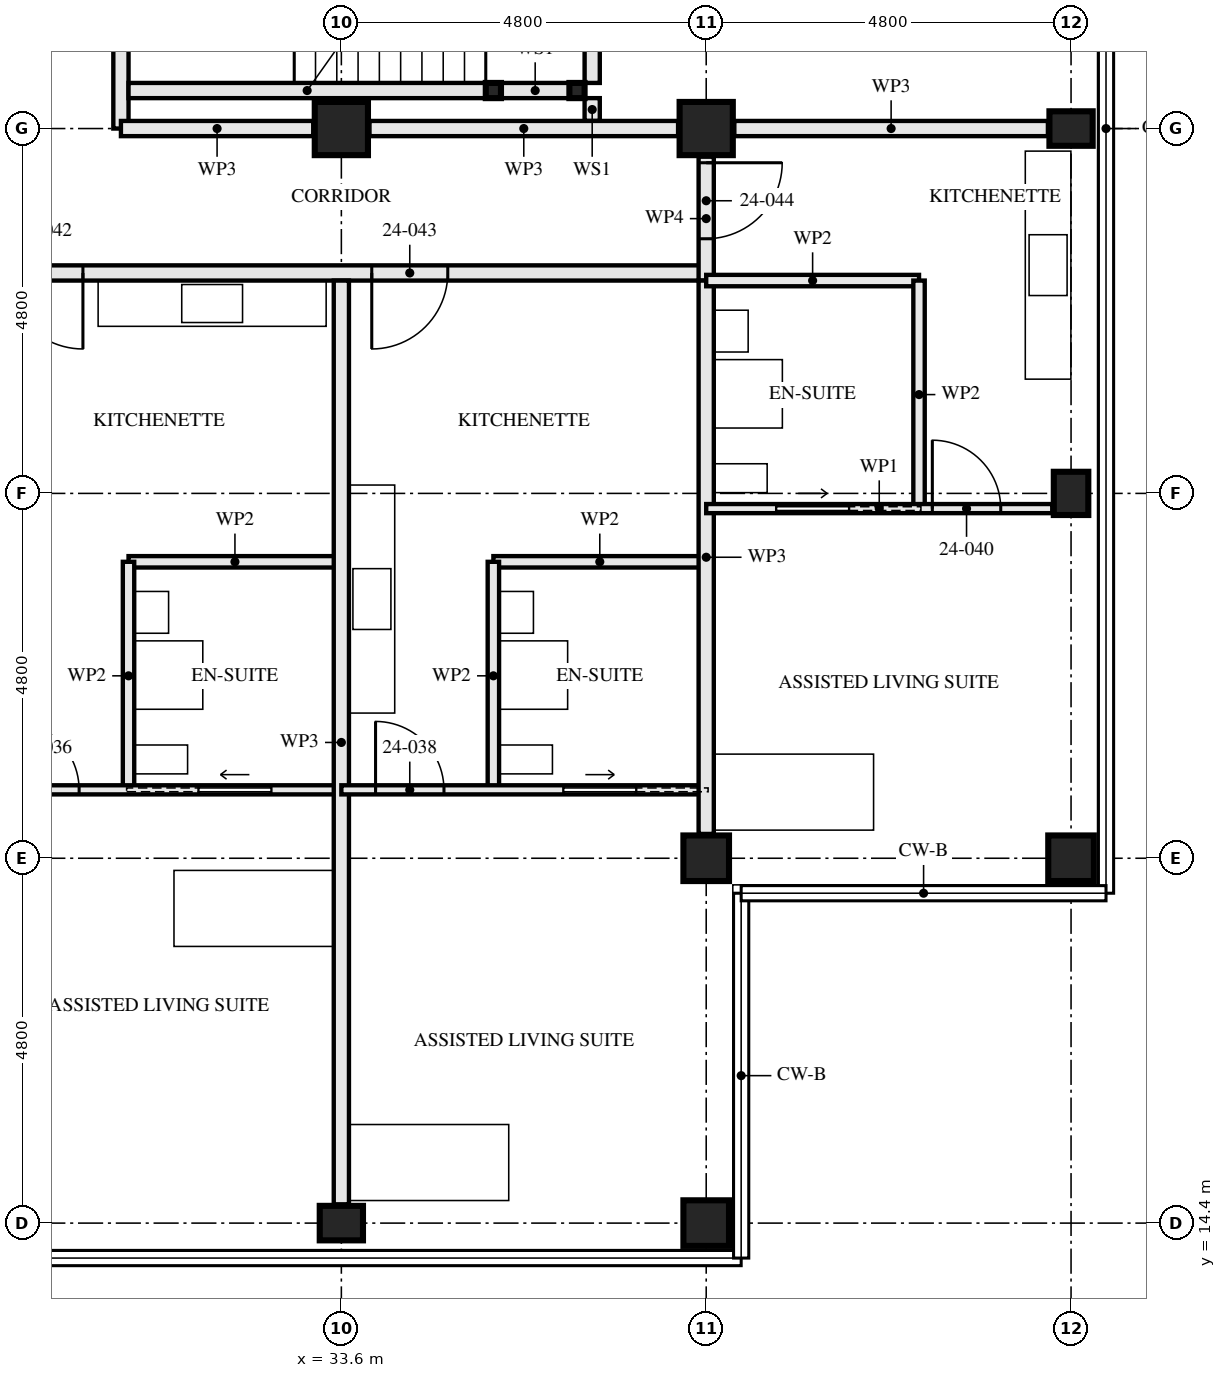
"""IFC4 building model, lengths in metres.
Left out: names, types, materials, properties, quantities, classifications, styles, units other than length and angle.
Written with IfcOpenShell. Run it as: python <this file> out.ifc"""

import sys

from ifc_helpers import new_model, si_unit, direction, frame, frame_2d, origin, origin_2d, place, context, subcontext, project, spatial, rectangle, hollow_rectangle, i_section, extrude, element, fill, save


model = new_model("IFC4")
c1 = context("Model", 3, precision=1e-05, world=origin(), true_north=direction((0.0, 1.0)))
c2 = subcontext(c1, "Body", "Model", "MODEL_VIEW")
j1 = project(units=[si_unit("LENGTHUNIT", "METRE"), si_unit("PLANEANGLEUNIT", "RADIAN")], contexts=[c1])
p1 = place(None, origin())
s1 = spatial("IfcSite", under=j1, at=p1, CompositionType="ELEMENT")
p2 = place(p1, origin())
s2 = spatial("IfcBuilding", under=s1, at=p2, CompositionType="ELEMENT")
p3 = place(p2, frame((0.0, 0.0, 91.0)))
s3 = spatial("IfcBuildingStorey", under=s2, at=p3, CompositionType="ELEMENT", Elevation=91.0)
p4 = place(p3, frame((33.6, 14.4, 0.0), z_axis=(0.0, 0.0, 1.0), x_axis=(0.0, 1.0, 0.0)))
e1 = element("IfcColumn", 1, at=p4, inside=s3, PredefinedType="COLUMN", context=c2, shape_type="SweptSolid", body=[
    extrude(i_section(OverallWidth=0.454, OverallDepth=0.569, WebThickness=0.078, FlangeThickness=0.125, FilletRadius=0.015, at=origin_2d()), origin(), (0.0, 0.0, 1.0), 3.5),
])
p5 = place(p3, frame((33.6, 28.8, 0.0), z_axis=(0.0, 0.0, 1.0), x_axis=(0.0, 1.0, 0.0)))
e2 = element("IfcColumn", 2, at=p5, inside=s3, PredefinedType="COLUMN", context=c2, shape_type="SweptSolid", body=[
    extrude(hollow_rectangle(XDim=0.7, YDim=0.7, WallThickness=0.06, at=origin_2d()), origin(), (0.0, 0.0, 1.0), 3.5),
])
for number, where, z_axis, x_axis in (
    (3, (38.4, 14.4, 0.0), (0.0, 0.0, 1.0), (0.0, 1.0, 0.0)),
    (4, (38.4, 19.2, 0.0), (0.0, 0.0, 1.0), (0.0, 1.0, 0.0)),
):
    element("IfcColumn", number, at=place(p3, frame(where, z_axis=z_axis, x_axis=x_axis)), inside=s3, PredefinedType="COLUMN", context=c2, shape_type="SweptSolid", body=[
        extrude(hollow_rectangle(XDim=0.6, YDim=0.6, WallThickness=0.05, at=origin_2d()), origin(), (0.0, 0.0, 1.0), 3.5),
    ])
p6 = place(p3, frame((38.4, 28.8, 0.0), z_axis=(0.0, 0.0, 1.0), x_axis=(0.0, 1.0, 0.0)))
e5 = element("IfcColumn", 5, at=p6, inside=s3, PredefinedType="COLUMN", context=c2, shape_type="SweptSolid", body=[
    extrude(hollow_rectangle(XDim=0.7, YDim=0.7, WallThickness=0.06, at=origin_2d()), origin(), (0.0, 0.0, 1.0), 3.5),
])
p7 = place(p3, frame((43.2, 19.2, 0.0), z_axis=(0.0, 0.0, 1.0), x_axis=(0.0, 1.0, 0.0)))
e6 = element("IfcColumn", 6, at=p7, inside=s3, PredefinedType="COLUMN", context=c2, shape_type="SweptSolid", body=[
    extrude(hollow_rectangle(XDim=0.6, YDim=0.6, WallThickness=0.05, at=origin_2d()), origin(), (0.0, 0.0, 1.0), 3.5),
])
for number, where, z_axis, x_axis in (
    (7, (43.2, 24.0, 0.0), (0.0, 0.0, 1.0), (1.0, 0.0, 0.0)),
    (8, (43.2, 28.8, 0.0), (0.0, 0.0, 1.0), (0.0, 1.0, 0.0)),
):
    element("IfcColumn", number, at=place(p3, frame(where, z_axis=z_axis, x_axis=x_axis)), inside=s3, PredefinedType="COLUMN", context=c2, shape_type="SweptSolid", body=[
        extrude(i_section(OverallWidth=0.454, OverallDepth=0.569, WebThickness=0.078, FlangeThickness=0.125, FilletRadius=0.015, at=origin_2d()), origin(), (0.0, 0.0, 1.0), 3.5),
    ])
for number, where, z_axis, x_axis in (
    (9, (36.7, 29.3, 0.0), (0.0, 0.0, 1.0), (1.0, 0.0, 0.0)),
    (10, (35.6, 29.3, 0.0), (0.0, 0.0, 1.0), (1.0, 0.0, 0.0)),
):
    element("IfcColumn", number, at=place(p3, frame(where, z_axis=z_axis, x_axis=x_axis)), inside=s3, PredefinedType="COLUMN", context=c2, shape_type="SweptSolid", body=[
        extrude(hollow_rectangle(XDim=0.2, YDim=0.2, WallThickness=0.008, at=origin_2d()), origin(), (0.0, 0.0, 1.0), 3.33),
    ])
p8 = place(p3, frame((30.8, 20.1, 0.0), z_axis=(0.0, 0.0, 1.0), x_axis=(0.0, 1.0, 0.0)))
e11 = element("IfcWall", 11, at=p8, inside=s3, PredefinedType="PARTITIONING", context=c2, shape_type="SweptSolid", body=[
    extrude(rectangle(XDim=3.0, YDim=0.15, at=frame_2d((1.5, 0.0))), origin(), (0.0, 0.0, 1.0), 3.33),
])
p9 = place(p3, frame((30.8, 23.1, 0.0), z_axis=(0.0, 0.0, 1.0), x_axis=(1.0, 0.0, 0.0)))
e12 = element("IfcWall", 12, at=p9, inside=s3, PredefinedType="PARTITIONING", context=c2, shape_type="SweptSolid", body=[
    extrude(rectangle(XDim=2.8, YDim=0.15, at=frame_2d((1.4, 0.0))), origin(), (0.0, 0.0, 1.0), 3.33),
])
p10 = place(p3, frame((28.8, 20.1, 0.0), z_axis=(0.0, 0.0, 1.0), x_axis=(1.0, 0.0, 0.0)))
e13 = element("IfcWall", 13, at=p10, inside=s3, PredefinedType="PARTITIONING", context=c2, shape_type="SweptSolid", body=[
    extrude(rectangle(XDim=4.8, YDim=0.12, at=frame_2d((2.4, 0.0))), origin(), (0.0, 0.0, 1.0), 3.33),
])
p11 = place(p10, frame((0.45, 0.0, 0.0)))
e14 = element("IfcOpeningElement", 14, at=p11, cuts=e13, PredefinedType="OPENING", context=c2, shape_type="SweptSolid", body=[
    extrude(rectangle(XDim=0.9, YDim=2.1, at=frame_2d((0.45, 1.05))), frame((0.0, 0.071, 0.0), z_axis=(0.0, -1.0, 0.0), x_axis=(1.0, 0.0, 0.0)), (0.0, 0.0, 1.0), 0.141),
])
p12 = place(p10, frame((2.925, 0.0, 0.0)))
e15 = element("IfcOpeningElement", 15, at=p12, cuts=e13, PredefinedType="OPENING", context=c2, shape_type="SweptSolid", body=[
    extrude(rectangle(XDim=0.95, YDim=2.1, at=frame_2d((0.475, 1.05))), frame((0.0, 0.071, 0.0), z_axis=(0.0, -1.0, 0.0), x_axis=(1.0, 0.0, 0.0)), (0.0, 0.0, 1.0), 0.141),
])
p13 = place(p3, frame((33.6, 14.647, 0.0), z_axis=(0.0, 0.0, 1.0), x_axis=(0.0, 1.0, 0.0)))
e16 = element("IfcWall", 16, at=p13, inside=s3, PredefinedType="PARTITIONING", context=c2, shape_type="SweptSolid", body=[
    extrude(rectangle(XDim=12.153, YDim=0.2, at=frame_2d((6.077, 0.0))), origin(), (0.0, 0.0, 1.0), 2.55),
])
p14 = place(p3, frame((35.6, 20.1, 0.0), z_axis=(0.0, 0.0, 1.0), x_axis=(0.0, 1.0, 0.0)))
e17 = element("IfcWall", 17, at=p14, inside=s3, PredefinedType="PARTITIONING", context=c2, shape_type="SweptSolid", body=[
    extrude(rectangle(XDim=3.0, YDim=0.15, at=frame_2d((1.5, 0.0))), origin(), (0.0, 0.0, 1.0), 3.33),
])
p15 = place(p3, frame((35.6, 23.1, 0.0), z_axis=(0.0, 0.0, 1.0), x_axis=(1.0, 0.0, 0.0)))
e18 = element("IfcWall", 18, at=p15, inside=s3, PredefinedType="PARTITIONING", context=c2, shape_type="SweptSolid", body=[
    extrude(rectangle(XDim=2.8, YDim=0.15, at=frame_2d((1.4, 0.0))), origin(), (0.0, 0.0, 1.0), 3.33),
])
p16 = place(p3, frame((33.6, 20.1, 0.0), z_axis=(0.0, 0.0, 1.0), x_axis=(1.0, 0.0, 0.0)))
e19 = element("IfcWall", 19, at=p16, inside=s3, PredefinedType="PARTITIONING", context=c2, shape_type="SweptSolid", body=[
    extrude(rectangle(XDim=4.8, YDim=0.12, at=frame_2d((2.4, 0.0))), origin(), (0.0, 0.0, 1.0), 3.33),
])
p17 = place(p16, frame((0.45, 0.0, 0.0)))
e20 = element("IfcOpeningElement", 20, at=p17, cuts=e19, PredefinedType="OPENING", context=c2, shape_type="SweptSolid", body=[
    extrude(rectangle(XDim=0.9, YDim=2.1, at=frame_2d((0.45, 1.05))), frame((0.0, 0.071, 0.0), z_axis=(0.0, -1.0, 0.0), x_axis=(1.0, 0.0, 0.0)), (0.0, 0.0, 1.0), 0.141),
])
p18 = place(p16, frame((2.925, 0.0, 0.0)))
e21 = element("IfcOpeningElement", 21, at=p18, cuts=e19, PredefinedType="OPENING", context=c2, shape_type="SweptSolid", body=[
    extrude(rectangle(XDim=0.95, YDim=2.1, at=frame_2d((0.475, 1.05))), frame((0.0, 0.071, 0.0), z_axis=(0.0, -1.0, 0.0), x_axis=(1.0, 0.0, 0.0)), (0.0, 0.0, 1.0), 0.141),
])
p19 = place(p3, frame((38.4, 19.52, 0.0), z_axis=(0.0, 0.0, 1.0), x_axis=(0.0, 1.0, 0.0)))
e22 = element("IfcWall", 22, at=p19, inside=s3, PredefinedType="PARTITIONING", context=c2, shape_type="SweptSolid", body=[
    extrude(rectangle(XDim=7.28, YDim=0.2, at=frame_2d((3.64, 0.0))), origin(), (0.0, 0.0, 1.0), 2.55),
])
p20 = place(p3, frame((41.2, 23.8, 0.0), z_axis=(0.0, 0.0, 1.0), x_axis=(0.0, 1.0, 0.0)))
e23 = element("IfcWall", 23, at=p20, inside=s3, PredefinedType="PARTITIONING", context=c2, shape_type="SweptSolid", body=[
    extrude(rectangle(XDim=3.0, YDim=0.15, at=frame_2d((1.5, 0.0))), origin(), (0.0, 0.0, 1.0), 2.55),
])
p21 = place(p3, frame((38.4, 26.8, 0.0), z_axis=(0.0, 0.0, 1.0), x_axis=(1.0, 0.0, 0.0)))
e24 = element("IfcWall", 24, at=p21, inside=s3, PredefinedType="PARTITIONING", context=c2, shape_type="SweptSolid", body=[
    extrude(rectangle(XDim=2.8, YDim=0.15, at=frame_2d((1.4, 0.0))), origin(), (0.0, 0.0, 1.0), 3.33),
])
p22 = place(p3, frame((38.4, 23.8, 0.0), z_axis=(0.0, 0.0, 1.0), x_axis=(1.0, 0.0, 0.0)))
e25 = element("IfcWall", 25, at=p22, inside=s3, PredefinedType="PARTITIONING", context=c2, shape_type="SweptSolid", body=[
    extrude(rectangle(XDim=4.553, YDim=0.12, at=frame_2d((2.276, 0.0))), origin(), (0.0, 0.0, 1.0), 3.33),
])
p23 = place(p22, frame((2.975, 0.0, 0.0)))
e26 = element("IfcOpeningElement", 26, at=p23, cuts=e25, PredefinedType="OPENING", context=c2, shape_type="SweptSolid", body=[
    extrude(rectangle(XDim=0.9, YDim=2.1, at=frame_2d((0.45, 1.05))), frame((0.0, 0.071, 0.0), z_axis=(0.0, -1.0, 0.0), x_axis=(1.0, 0.0, 0.0)), (0.0, 0.0, 1.0), 0.141),
])
p24 = place(p22, frame((0.925, 0.0, 0.0)))
e27 = element("IfcOpeningElement", 27, at=p24, cuts=e25, PredefinedType="OPENING", context=c2, shape_type="SweptSolid", body=[
    extrude(rectangle(XDim=0.95, YDim=2.1, at=frame_2d((0.475, 1.05))), frame((0.0, 0.071, 0.0), z_axis=(0.0, -1.0, 0.0), x_axis=(1.0, 0.0, 0.0)), (0.0, 0.0, 1.0), 0.141),
])
p25 = place(p3, frame((28.8, 26.9, 0.0), z_axis=(0.0, 0.0, 1.0), x_axis=(1.0, 0.0, 0.0)))
e28 = element("IfcWall", 28, at=p25, inside=s3, PredefinedType="PARTITIONING", context=c2, shape_type="SweptSolid", body=[
    extrude(rectangle(XDim=9.6, YDim=0.2, at=frame_2d((4.8, 0.0))), origin(), (0.0, 0.0, 1.0), 3.33),
])
p26 = place(p25, frame((0.4, 0.0, 0.0)))
e29 = element("IfcOpeningElement", 29, at=p26, cuts=e28, PredefinedType="OPENING", context=c2, shape_type="SweptSolid", body=[
    extrude(rectangle(XDim=1.0, YDim=2.1, at=frame_2d((0.5, 1.05))), frame((0.0, 0.111, 0.0), z_axis=(0.0, -1.0, 0.0), x_axis=(1.0, 0.0, 0.0)), (0.0, 0.0, 1.0), 0.221),
])
p27 = place(p25, frame((5.2, 0.0, 0.0)))
e30 = element("IfcOpeningElement", 30, at=p27, cuts=e28, PredefinedType="OPENING", context=c2, shape_type="SweptSolid", body=[
    extrude(rectangle(XDim=1.0, YDim=2.1, at=frame_2d((0.5, 1.05))), frame((0.0, 0.111, 0.0), z_axis=(0.0, -1.0, 0.0), x_axis=(1.0, 0.0, 0.0)), (0.0, 0.0, 1.0), 0.221),
])
p28 = place(p3, frame((38.4, 26.8, 0.0), z_axis=(0.0, 0.0, 1.0), x_axis=(0.0, 1.0, 0.0)))
e31 = element("IfcWall", 31, at=p28, inside=s3, PredefinedType="PARTITIONING", context=c2, shape_type="SweptSolid", body=[
    extrude(rectangle(XDim=1.63, YDim=0.2, at=frame_2d((0.815, 0.0))), origin(), (0.0, 0.0, 1.0), 3.33),
])
p29 = place(p28, frame((0.55, 0.0, 0.0)))
e32 = element("IfcOpeningElement", 32, at=p29, cuts=e31, PredefinedType="OPENING", context=c2, shape_type="SweptSolid", body=[
    extrude(rectangle(XDim=1.0, YDim=2.1, at=frame_2d((0.5, 1.05))), frame((0.0, 0.111, 0.0), z_axis=(0.0, -1.0, 0.0), x_axis=(1.0, 0.0, 0.0)), (0.0, 0.0, 1.0), 0.221),
])
p30 = place(p3, frame((36.6, 29.3, 0.0), z_axis=(0.0, 0.0, 1.0), x_axis=(-1.0, 0.0, 0.0)))
e33 = element("IfcWall", 33, at=p30, inside=s3, PredefinedType="SOLIDWALL", context=c2, shape_type="SweptSolid", body=[
    extrude(rectangle(XDim=0.9, YDim=0.2, at=frame_2d((0.45, 0.0))), origin(), (0.0, 0.0, 1.0), 2.99),
])
p31 = place(p3, frame((35.5, 29.3, 0.0), z_axis=(0.0, 0.0, 1.0), x_axis=(-1.0, 0.0, 0.0)))
e34 = element("IfcWall", 34, at=p31, inside=s3, PredefinedType="SOLIDWALL", context=c2, shape_type="SweptSolid", body=[
    extrude(rectangle(XDim=4.7, YDim=0.2, at=frame_2d((2.35, 0.0))), origin(), (0.0, 0.0, 1.0), 2.99),
])
p32 = place(p3, frame((36.9, 28.9, 0.0), z_axis=(0.0, 0.0, 1.0), x_axis=(0.0, 1.0, 0.0)))
e35 = element("IfcWall", 35, at=p32, inside=s3, PredefinedType="SOLIDWALL", context=c2, shape_type="SweptSolid", body=[
    extrude(rectangle(XDim=0.3, YDim=0.2, at=frame_2d((0.15, 0.0))), origin(), (0.0, 0.0, 1.0), 3.33),
])
p33 = place(p3, frame((36.9, 29.4, 0.0), z_axis=(0.0, 0.0, 1.0), x_axis=(0.0, 1.0, 0.0)))
e36 = element("IfcWall", 36, at=p33, inside=s3, PredefinedType="SOLIDWALL", context=c2, shape_type="SweptSolid", body=[
    extrude(rectangle(XDim=2.6, YDim=0.2, at=frame_2d((1.3, 0.0))), origin(), (0.0, 0.0, 1.0), 3.33),
])
p34 = place(p3, frame((30.7, 28.8, 0.0), z_axis=(0.0, 0.0, 1.0), x_axis=(0.0, 1.0, 0.0)))
e37 = element("IfcWall", 37, at=p34, inside=s3, PredefinedType="PARTITIONING", context=c2, shape_type="SweptSolid", body=[
    extrude(rectangle(XDim=14.84, YDim=0.2, at=frame_2d((7.42, 0.0))), origin(), (0.0, 0.0, 1.0), 2.32),
])
p35 = place(p34, frame((1.4, 0.0, 0.0)))
e38 = element("IfcOpeningElement", 38, at=p35, cuts=e37, PredefinedType="OPENING", context=c2, shape_type="SweptSolid", body=[
    extrude(rectangle(XDim=1.0, YDim=2.1, at=frame_2d((0.5, 1.05))), frame((0.0, 0.111, 0.0), z_axis=(0.0, -1.0, 0.0), x_axis=(1.0, 0.0, 0.0)), (0.0, 0.0, 1.0), 0.221),
])
p36 = place(p34, frame((4.1, 0.0, 0.0)))
e39 = element("IfcOpeningElement", 39, at=p36, cuts=e37, PredefinedType="OPENING", context=c2, shape_type="SweptSolid", body=[
    extrude(rectangle(XDim=1.0, YDim=2.1, at=frame_2d((0.5, 1.05))), frame((0.0, 0.111, 0.0), z_axis=(0.0, -1.0, 0.0), x_axis=(1.0, 0.0, 0.0)), (0.0, 0.0, 1.0), 0.221),
])
p37 = place(p34, frame((5.975, 0.0, 0.0)))
e40 = element("IfcOpeningElement", 40, at=p37, cuts=e37, PredefinedType="OPENING", context=c2, shape_type="SweptSolid", body=[
    extrude(rectangle(XDim=1.0, YDim=2.1, at=frame_2d((0.5, 1.05))), frame((0.0, 0.111, 0.0), z_axis=(0.0, -1.0, 0.0), x_axis=(1.0, 0.0, 0.0)), (0.0, 0.0, 1.0), 0.221),
])
p38 = place(p34, frame((13.0, 0.0, 0.0)))
e41 = element("IfcOpeningElement", 41, at=p38, cuts=e37, PredefinedType="OPENING", context=c2, shape_type="SweptSolid", body=[
    extrude(rectangle(XDim=1.0, YDim=2.1, at=frame_2d((0.5, 1.05))), frame((0.0, 0.111, 0.0), z_axis=(0.0, -1.0, 0.0), x_axis=(1.0, 0.0, 0.0)), (0.0, 0.0, 1.0), 0.221),
])
p39 = place(p3, frame((42.896, 28.8, 0.0), z_axis=(0.0, 0.0, 1.0), x_axis=(-1.0, 0.0, 0.0)))
e42 = element("IfcWall", 42, at=p39, inside=s3, PredefinedType="PARTITIONING", context=c2, shape_type="SweptSolid", body=[
    extrude(rectangle(XDim=4.125, YDim=0.2, at=frame_2d((2.063, 0.0))), origin(), (0.0, 0.0, 1.0), 2.32),
])
p40 = place(p3, frame((38.03, 28.8, 0.0), z_axis=(0.0, 0.0, 1.0), x_axis=(-1.0, 0.0, 0.0)))
e43 = element("IfcWall", 43, at=p40, inside=s3, PredefinedType="PARTITIONING", context=c2, shape_type="SweptSolid", body=[
    extrude(rectangle(XDim=4.06, YDim=0.2, at=frame_2d((2.03, 0.0))), origin(), (0.0, 0.0, 1.0), 2.32),
])
p41 = place(p3, frame((33.23, 28.8, 0.0), z_axis=(0.0, 0.0, 1.0), x_axis=(-1.0, 0.0, 0.0)))
e44 = element("IfcWall", 44, at=p41, inside=s3, PredefinedType="PARTITIONING", context=c2, shape_type="SweptSolid", body=[
    extrude(rectangle(XDim=2.53, YDim=0.2, at=frame_2d((1.265, 0.0))), origin(), (0.0, 0.0, 1.0), 2.32),
])
p42 = place(p11, origin())
e45 = element("IfcDoor", 45, at=p42, inside=s3, OperationType="SINGLE_SWING_RIGHT", PredefinedType="DOOR", context=c2, shape_type="SweptSolid", body=[
    extrude(rectangle(XDim=0.9, YDim=2.1, at=frame_2d((0.45, 1.05))), frame((0.0, 0.022, 0.0), z_axis=(0.0, -1.0, 0.0), x_axis=(1.0, 0.0, 0.0)), (0.0, 0.0, 1.0), 0.044),
])
fill(e14, e45)
p43 = place(p12, origin())
e46 = element("IfcDoor", 46, at=p43, inside=s3, OperationType="SLIDING_TO_RIGHT", PredefinedType="DOOR", context=c2, shape_type="SweptSolid", body=[
    extrude(rectangle(XDim=0.95, YDim=2.1, at=frame_2d((0.475, 1.05))), frame((0.0, 0.022, 0.0), z_axis=(0.0, -1.0, 0.0), x_axis=(1.0, 0.0, 0.0)), (0.0, 0.0, 1.0), 0.044),
])
fill(e15, e46)
p44 = place(p17, origin())
e47 = element("IfcDoor", 47, at=p44, inside=s3, OperationType="SINGLE_SWING_RIGHT", PredefinedType="DOOR", context=c2, shape_type="SweptSolid", body=[
    extrude(rectangle(XDim=0.9, YDim=2.1, at=frame_2d((0.45, 1.05))), frame((0.0, 0.022, 0.0), z_axis=(0.0, -1.0, 0.0), x_axis=(1.0, 0.0, 0.0)), (0.0, 0.0, 1.0), 0.044),
])
fill(e20, e47)
p45 = place(p18, origin())
e48 = element("IfcDoor", 48, at=p45, inside=s3, OperationType="SLIDING_TO_LEFT", PredefinedType="DOOR", context=c2, shape_type="SweptSolid", body=[
    extrude(rectangle(XDim=0.95, YDim=2.1, at=frame_2d((0.475, 1.05))), frame((0.0, 0.022, 0.0), z_axis=(0.0, -1.0, 0.0), x_axis=(1.0, 0.0, 0.0)), (0.0, 0.0, 1.0), 0.044),
])
fill(e21, e48)
p46 = place(p23, origin())
e49 = element("IfcDoor", 49, at=p46, inside=s3, OperationType="SINGLE_SWING_RIGHT", PredefinedType="DOOR", context=c2, shape_type="SweptSolid", body=[
    extrude(rectangle(XDim=0.9, YDim=2.1, at=frame_2d((0.45, 1.05))), frame((0.0, 0.022, 0.0), z_axis=(0.0, -1.0, 0.0), x_axis=(1.0, 0.0, 0.0)), (0.0, 0.0, 1.0), 0.044),
])
fill(e26, e49)
p47 = place(p24, origin())
e50 = element("IfcDoor", 50, at=p47, inside=s3, OperationType="SLIDING_TO_LEFT", PredefinedType="DOOR", context=c2, shape_type="SweptSolid", body=[
    extrude(rectangle(XDim=0.95, YDim=2.1, at=frame_2d((0.475, 1.05))), frame((0.0, 0.022, 0.0), z_axis=(0.0, -1.0, 0.0), x_axis=(1.0, 0.0, 0.0)), (0.0, 0.0, 1.0), 0.044),
])
fill(e27, e50)
p48 = place(p26, frame((1.0, 0.0, 0.0), z_axis=(0.0, 0.0, 1.0), x_axis=(-1.0, 0.0, 0.0)))
e51 = element("IfcDoor", 51, at=p48, inside=s3, OperationType="SINGLE_SWING_RIGHT", PredefinedType="DOOR", context=c2, shape_type="SweptSolid", body=[
    extrude(rectangle(XDim=1.0, YDim=2.1, at=frame_2d((0.5, 1.05))), frame((0.0, 0.027, 0.0), z_axis=(0.0, -1.0, 0.0), x_axis=(1.0, 0.0, 0.0)), (0.0, 0.0, 1.0), 0.054),
])
fill(e29, e51)
p49 = place(p27, frame((1.0, 0.0, 0.0), z_axis=(0.0, 0.0, 1.0), x_axis=(-1.0, 0.0, 0.0)))
e52 = element("IfcDoor", 52, at=p49, inside=s3, OperationType="SINGLE_SWING_LEFT", PredefinedType="DOOR", context=c2, shape_type="SweptSolid", body=[
    extrude(rectangle(XDim=1.0, YDim=2.1, at=frame_2d((0.5, 1.05))), frame((0.0, 0.027, 0.0), z_axis=(0.0, -1.0, 0.0), x_axis=(1.0, 0.0, 0.0)), (0.0, 0.0, 1.0), 0.054),
])
fill(e30, e52)
p50 = place(p29, frame((1.0, 0.0, 0.0), z_axis=(0.0, 0.0, 1.0), x_axis=(-1.0, 0.0, 0.0)))
e53 = element("IfcDoor", 53, at=p50, inside=s3, OperationType="SINGLE_SWING_RIGHT", PredefinedType="DOOR", context=c2, shape_type="SweptSolid", body=[
    extrude(rectangle(XDim=1.0, YDim=2.1, at=frame_2d((0.5, 1.05))), frame((0.0, 0.027, 0.0), z_axis=(0.0, -1.0, 0.0), x_axis=(1.0, 0.0, 0.0)), (0.0, 0.0, 1.0), 0.054),
])
fill(e32, e53)
save(model, sys.argv[1])
